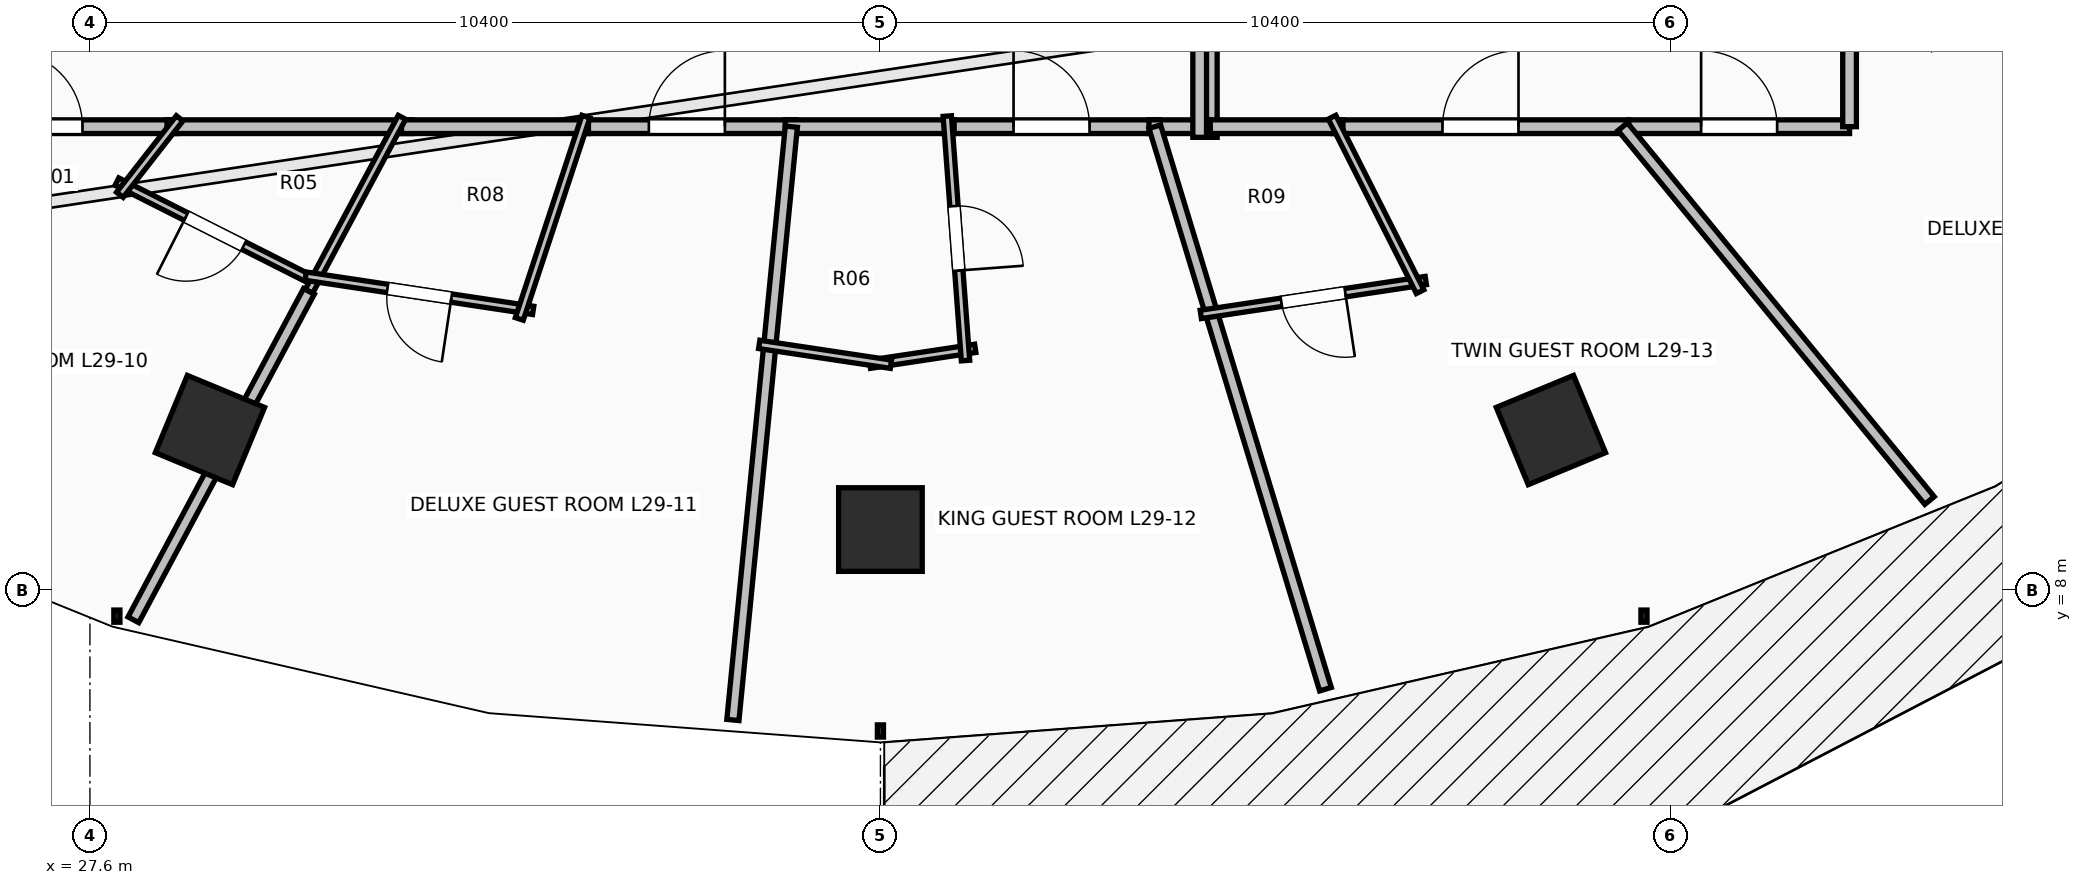
"""IFC4 building model, lengths in metres.
Left out: names, types, materials, properties, quantities, classifications, styles, units other than length and angle.
Written with IfcOpenShell. Run it as: python <this file> out.ifc"""

import sys

from ifc_helpers import new_model, si_unit, direction, frame, frame_2d, origin, origin_2d, place, context, subcontext, project, spatial, rectangle, extrude, element, fill, save


model = new_model("IFC4")
c1 = context("Model", 3, precision=1e-05, world=origin(), true_north=direction((0.0, 1.0)))
c2 = subcontext(c1, "Body", "Model", "MODEL_VIEW")
j1 = project(units=[si_unit("LENGTHUNIT", "METRE"), si_unit("PLANEANGLEUNIT", "RADIAN")], contexts=[c1])
p1 = place(None, origin())
s1 = spatial("IfcSite", under=j1, at=p1, CompositionType="ELEMENT")
p2 = place(p1, origin())
s2 = spatial("IfcBuilding", under=s1, at=p2, CompositionType="ELEMENT")
p3 = place(p2, frame((0.0, 0.0, 110.3)))
s3 = spatial("IfcBuildingStorey", under=s2, at=p3, CompositionType="ELEMENT", Elevation=110.3)
for number, where, z_axis, x_axis in (
    (1, (29.179, 10.109, 0.0), (0.0, 0.0, 1.0), (-0.383, -0.924, 0.0)),
    (2, (38.0, 8.8, 0.0), (0.0, 0.0, 1.0), (0.0, -1.0, 0.0)),
    (3, (46.821, 10.109, 0.0), (0.0, 0.0, 1.0), (0.383, -0.924, 0.0)),
):
    element("IfcColumn", number, at=place(p3, frame(where, z_axis=z_axis, x_axis=x_axis)), inside=s3, PredefinedType="COLUMN", context=c2, shape_type="SweptSolid", body=[
        extrude(rectangle(XDim=1.1, YDim=1.1, at=origin_2d()), origin(), (0.0, 0.0, 1.0), 3.5),
    ])
p4 = place(p3, frame((25.25, 14.1, 0.0), z_axis=(0.0, 0.0, 1.0), x_axis=(1.0, 0.0, 0.0)))
e4 = element("IfcWall", 4, at=p4, inside=s3, PredefinedType="PARTITIONING", context=c2, shape_type="SweptSolid", body=[
    extrude(rectangle(XDim=3.504, YDim=0.18, at=frame_2d((1.752, 0.0))), origin(), (0.0, 0.0, 1.0), 2.432),
])
p5 = place(p4, frame((1.252, 0.0, 0.0)))
e5 = element("IfcOpeningElement", 5, at=p5, cuts=e4, PredefinedType="OPENING", context=c2, shape_type="SweptSolid", body=[
    extrude(rectangle(XDim=1.0, YDim=2.15, at=frame_2d((0.5, 1.075))), frame((0.0, 0.105, 0.0), z_axis=(0.0, -1.0, 0.0), x_axis=(1.0, 0.0, 0.0)), (0.0, 0.0, 1.0), 0.21),
])
p6 = place(p3, frame((28.614, 14.1, 0.0), z_axis=(0.0, 0.0, 1.0), x_axis=(1.0, 0.0, 0.0)))
e6 = element("IfcWall", 6, at=p6, inside=s3, PredefinedType="PARTITIONING", context=c2, shape_type="SweptSolid", body=[
    extrude(rectangle(XDim=3.225, YDim=0.18, at=frame_2d((1.613, 0.0))), origin(), (0.0, 0.0, 1.0), 2.929),
])
p7 = place(p3, frame((34.019, 14.1, 0.0), z_axis=(0.0, 0.0, 1.0), x_axis=(1.0, 0.0, 0.0)))
e7 = element("IfcWall", 7, at=p7, inside=s3, PredefinedType="PARTITIONING", context=c2, shape_type="SweptSolid", body=[
    extrude(rectangle(XDim=2.869, YDim=0.18, at=frame_2d((1.435, 0.0))), origin(), (0.0, 0.0, 1.0), 2.929),
])
p8 = place(p7, frame((0.935, 0.0, 0.0)))
e8 = element("IfcOpeningElement", 8, at=p8, cuts=e7, PredefinedType="OPENING", context=c2, shape_type="SweptSolid", body=[
    extrude(rectangle(XDim=1.0, YDim=2.15, at=frame_2d((0.5, 1.075))), frame((0.0, 0.105, 0.0), z_axis=(0.0, -1.0, 0.0), x_axis=(1.0, 0.0, 0.0)), (0.0, 0.0, 1.0), 0.21),
])
p9 = place(p3, frame((31.699, 14.1, 0.0), z_axis=(0.0, 0.0, 1.0), x_axis=(1.0, 0.0, 0.0)))
e9 = element("IfcWall", 9, at=p9, inside=s3, PredefinedType="PARTITIONING", context=c2, shape_type="SweptSolid", body=[
    extrude(rectangle(XDim=2.46, YDim=0.18, at=frame_2d((1.23, 0.0))), origin(), (0.0, 0.0, 1.0), 2.929),
])
p10 = place(p3, frame((38.83, 14.1, 0.0), z_axis=(0.0, 0.0, 1.0), x_axis=(1.0, 0.0, 0.0)))
e10 = element("IfcWall", 10, at=p10, inside=s3, PredefinedType="PARTITIONING", context=c2, shape_type="SweptSolid", body=[
    extrude(rectangle(XDim=2.843, YDim=0.18, at=frame_2d((1.421, 0.0))), origin(), (0.0, 0.0, 1.0), 2.929),
])
p11 = place(p10, frame((0.921, 0.0, 0.0)))
e11 = element("IfcOpeningElement", 11, at=p11, cuts=e10, PredefinedType="OPENING", context=c2, shape_type="SweptSolid", body=[
    extrude(rectangle(XDim=1.0, YDim=2.15, at=frame_2d((0.5, 1.075))), frame((0.0, 0.105, 0.0), z_axis=(0.0, -1.0, 0.0), x_axis=(1.0, 0.0, 0.0)), (0.0, 0.0, 1.0), 0.21),
])
p12 = place(p3, frame((36.748, 14.1, 0.0), z_axis=(0.0, 0.0, 1.0), x_axis=(1.0, 0.0, 0.0)))
e12 = element("IfcWall", 12, at=p12, inside=s3, PredefinedType="PARTITIONING", context=c2, shape_type="SweptSolid", body=[
    extrude(rectangle(XDim=2.222, YDim=0.18, at=frame_2d((1.111, 0.0))), origin(), (0.0, 0.0, 1.0), 2.929),
])
p13 = place(p3, frame((43.945, 14.1, 0.0), z_axis=(0.0, 0.0, 1.0), x_axis=(1.0, 0.0, 0.0)))
e13 = element("IfcWall", 13, at=p13, inside=s3, PredefinedType="PARTITIONING", context=c2, shape_type="SweptSolid", body=[
    extrude(rectangle(XDim=3.899, YDim=0.18, at=frame_2d((1.949, 0.0))), origin(), (0.0, 0.0, 1.0), 2.432),
])
p14 = place(p13, frame((1.449, 0.0, 0.0)))
e14 = element("IfcOpeningElement", 14, at=p14, cuts=e13, PredefinedType="OPENING", context=c2, shape_type="SweptSolid", body=[
    extrude(rectangle(XDim=1.0, YDim=2.15, at=frame_2d((0.5, 1.075))), frame((0.0, 0.105, 0.0), z_axis=(0.0, -1.0, 0.0), x_axis=(1.0, 0.0, 0.0)), (0.0, 0.0, 1.0), 0.21),
])
p15 = place(p3, frame((42.34, 16.38, 0.0), z_axis=(0.0, 0.0, 1.0), x_axis=(0.0, -1.0, 0.0)))
e15 = element("IfcWall", 15, at=p15, inside=s3, PredefinedType="PARTITIONING", context=c2, shape_type="SweptSolid", body=[
    extrude(rectangle(XDim=2.42, YDim=0.18, at=frame_2d((1.21, 0.0))), origin(), (0.0, 0.0, 1.0), 2.929),
])
p16 = place(p3, frame((42.2, 14.1, 0.0), z_axis=(0.0, 0.0, 1.0), x_axis=(1.0, 0.0, 0.0)))
e16 = element("IfcWall", 16, at=p16, inside=s3, PredefinedType="PARTITIONING", context=c2, shape_type="SweptSolid", body=[
    extrude(rectangle(XDim=1.885, YDim=0.18, at=frame_2d((0.942, 0.0))), origin(), (0.0, 0.0, 1.0), 2.929),
])
p17 = place(p3, frame((41.533, 14.1, 0.0), z_axis=(0.0, 0.0, 1.0), x_axis=(1.0, 0.0, 0.0)))
e17 = element("IfcWall", 17, at=p17, inside=s3, PredefinedType="PARTITIONING", context=c2, shape_type="SweptSolid", body=[
    extrude(rectangle(XDim=0.807, YDim=0.18, at=frame_2d((0.404, 0.0))), origin(), (0.0, 0.0, 1.0), 2.929),
])
p18 = place(p3, frame((42.2, 13.96, 0.0), z_axis=(0.0, 0.0, 1.0), x_axis=(0.0, 1.0, 0.0)))
e18 = element("IfcWall", 18, at=p18, inside=s3, PredefinedType="PARTITIONING", context=c2, shape_type="SweptSolid", body=[
    extrude(rectangle(XDim=2.42, YDim=0.18, at=frame_2d((1.21, 0.0))), origin(), (0.0, 0.0, 1.0), 2.929),
])
p19 = place(p3, frame((47.844, 14.1, 0.0), z_axis=(0.0, 0.0, 1.0), x_axis=(1.0, 0.0, 0.0)))
e19 = element("IfcWall", 19, at=p19, inside=s3, PredefinedType="PARTITIONING", context=c2, shape_type="SweptSolid", body=[
    extrude(rectangle(XDim=2.906, YDim=0.18, at=frame_2d((1.453, 0.0))), origin(), (0.0, 0.0, 1.0), 2.432),
])
p20 = place(p19, frame((0.953, 0.0, 0.0)))
e20 = element("IfcOpeningElement", 20, at=p20, cuts=e19, PredefinedType="OPENING", context=c2, shape_type="SweptSolid", body=[
    extrude(rectangle(XDim=1.0, YDim=2.15, at=frame_2d((0.5, 1.075))), frame((0.0, 0.105, 0.0), z_axis=(0.0, -1.0, 0.0), x_axis=(1.0, 0.0, 0.0)), (0.0, 0.0, 1.0), 0.21),
])
p21 = place(p3, frame((50.75, 14.1, 0.0), z_axis=(0.0, 0.0, 1.0), x_axis=(0.0, 1.0, 0.0)))
e21 = element("IfcWall", 21, at=p21, inside=s3, PredefinedType="PARTITIONING", context=c2, shape_type="SweptSolid", body=[
    extrude(rectangle(XDim=1.99, YDim=0.18, at=frame_2d((0.995, 0.0))), origin(), (0.0, 0.0, 1.0), 2.432),
])
p22 = place(p3, frame((30.533, 12.075, 0.0), z_axis=(0.0, 0.0, 1.0), x_axis=(-0.89257679281, 0.450895407979, 0.0)))
e22 = element("IfcWall", 22, at=p22, inside=s3, PredefinedType="PARTITIONING", context=c2, shape_type="SweptSolid", body=[
    extrude(rectangle(XDim=2.888, YDim=0.11, at=frame_2d((1.444, 0.0))), origin(), (0.0, 0.0, 1.0), 2.432),
])
p23 = place(p22, frame((1.019, 0.0, 0.0)))
e23 = element("IfcOpeningElement", 23, at=p23, cuts=e22, PredefinedType="OPENING", context=c2, shape_type="SweptSolid", body=[
    extrude(rectangle(XDim=0.85, YDim=2.1, at=frame_2d((0.425, 1.05))), frame((0.0, 0.07, 0.0), z_axis=(0.0, -1.0, 0.0), x_axis=(1.0, 0.0, 0.0)), (0.0, 0.0, 1.0), 0.14),
])
p24 = place(p3, frame((27.994, 13.204, 0.0), z_axis=(0.0, 0.0, 1.0), x_axis=(0.615632914819, 0.788033066687, 0.0)))
e24 = element("IfcWall", 24, at=p24, inside=s3, PredefinedType="PARTITIONING", context=c2, shape_type="SweptSolid", body=[
    extrude(rectangle(XDim=1.277, YDim=0.11, at=frame_2d((0.639, 0.0))), origin(), (0.0, 0.0, 1.0), 2.432),
])
p25 = place(p3, frame((30.481, 11.934, 0.0), z_axis=(0.0, 0.0, 1.0), x_axis=(0.471456709401, 0.881889205718, 0.0)))
e25 = element("IfcWall", 25, at=p25, inside=s3, PredefinedType="PARTITIONING", context=c2, shape_type="SweptSolid", body=[
    extrude(rectangle(XDim=2.596, YDim=0.11, at=frame_2d((1.298, 0.0))), origin(), (0.0, 0.0, 1.0), 2.886),
])
p26 = place(p3, frame((28.172, 7.613, 0.0), z_axis=(0.0, 0.0, 1.0), x_axis=(0.47136925097, 0.881935955294, 0.0)))
e26 = element("IfcWall", 26, at=p26, inside=s3, PredefinedType="PARTITIONING", context=c2, shape_type="SweptSolid", body=[
    extrude(rectangle(XDim=4.899, YDim=0.16, at=frame_2d((2.449, 0.0))), origin(), (0.0, 0.0, 1.0), 2.677),
])
p27 = place(p3, frame((33.431, 11.683, 0.0), z_axis=(0.0, 0.0, 1.0), x_axis=(-0.988849795555, 0.148916358508, 0.0)))
e27 = element("IfcWall", 27, at=p27, inside=s3, PredefinedType="PARTITIONING", context=c2, shape_type="SweptSolid", body=[
    extrude(rectangle(XDim=3.026, YDim=0.11, at=frame_2d((1.513, 0.0))), origin(), (0.0, 0.0, 1.0), 2.886),
])
p28 = place(p27, frame((1.088, 0.0, 0.0)))
e28 = element("IfcOpeningElement", 28, at=p28, cuts=e27, PredefinedType="OPENING", context=c2, shape_type="SweptSolid", body=[
    extrude(rectangle(XDim=0.85, YDim=2.1, at=frame_2d((0.425, 1.05))), frame((0.0, 0.07, 0.0), z_axis=(0.0, -1.0, 0.0), x_axis=(1.0, 0.0, 0.0)), (0.0, 0.0, 1.0), 0.14),
])
p29 = place(p3, frame((34.126, 14.233, 0.0), z_axis=(0.0, 0.0, 1.0), x_axis=(-0.312749678962, -0.949835584882, 0.0)))
e29 = element("IfcWall", 29, at=p29, inside=s3, PredefinedType="PARTITIONING", context=c2, shape_type="SweptSolid", body=[
    extrude(rectangle(XDim=2.802, YDim=0.11, at=frame_2d((1.401, 0.0))), origin(), (0.0, 0.0, 1.0), 2.886),
])
p30 = place(p3, frame((36.059, 6.295, 0.0), z_axis=(0.0, 0.0, 1.0), x_axis=(0.098024226043, 0.995184028765, 0.0)))
e30 = element("IfcWall", 30, at=p30, inside=s3, PredefinedType="PARTITIONING", context=c2, shape_type="SweptSolid", body=[
    extrude(rectangle(XDim=7.843, YDim=0.16, at=frame_2d((3.921, 0.0))), origin(), (0.0, 0.0, 1.0), 2.677),
])
p31 = place(p3, frame((39.247, 11.184, 0.0), z_axis=(0.0, 0.0, 1.0), x_axis=(-0.988844156702, -0.148953797389, 0.0)))
e31 = element("IfcWall", 31, at=p31, inside=s3, PredefinedType="PARTITIONING", context=c2, shape_type="SweptSolid", body=[
    extrude(rectangle(XDim=1.401, YDim=0.11, at=frame_2d((0.701, 0.0))), origin(), (0.0, 0.0, 1.0), 3.24),
])
p32 = place(p3, frame((38.138, 10.975, 0.0), z_axis=(0.0, 0.0, 1.0), x_axis=(-0.988868806461, 0.148790065554, 0.0)))
e32 = element("IfcWall", 32, at=p32, inside=s3, PredefinedType="PARTITIONING", context=c2, shape_type="SweptSolid", body=[
    extrude(rectangle(XDim=1.752, YDim=0.11, at=frame_2d((0.876, 0.0))), origin(), (0.0, 0.0, 1.0), 3.24),
])
p33 = place(p3, frame((38.88, 14.24, 0.0), z_axis=(0.0, 0.0, 1.0), x_axis=(0.074340146514, -0.997232943006, 0.0)))
e33 = element("IfcWall", 33, at=p33, inside=s3, PredefinedType="PARTITIONING", context=c2, shape_type="SweptSolid", body=[
    extrude(rectangle(XDim=3.225, YDim=0.11, at=frame_2d((1.613, 0.0))), origin(), (0.0, 0.0, 1.0), 2.886),
])
p34 = place(p33, frame((1.188, 0.0, 0.0)))
e34 = element("IfcOpeningElement", 34, at=p34, cuts=e33, PredefinedType="OPENING", context=c2, shape_type="SweptSolid", body=[
    extrude(rectangle(XDim=0.85, YDim=2.1, at=frame_2d((0.425, 1.05))), frame((0.0, 0.07, 0.0), z_axis=(0.0, -1.0, 0.0), x_axis=(1.0, 0.0, 0.0)), (0.0, 0.0, 1.0), 0.14),
])
p35 = place(p3, frame((43.855, 6.7, 0.0), z_axis=(0.0, 0.0, 1.0), x_axis=(-0.290292155577, 0.956938067176, 0.0)))
e35 = element("IfcWall", 35, at=p35, inside=s3, PredefinedType="PARTITIONING", context=c2, shape_type="SweptSolid", body=[
    extrude(rectangle(XDim=7.733, YDim=0.16, at=frame_2d((3.867, 0.0))), origin(), (0.0, 0.0, 1.0), 2.432),
])
p36 = place(p3, frame((45.175, 12.076, 0.0), z_axis=(0.0, 0.0, 1.0), x_axis=(-0.988865063855, -0.148814937044, 0.0)))
e36 = element("IfcWall", 36, at=p36, inside=s3, PredefinedType="PARTITIONING", context=c2, shape_type="SweptSolid", body=[
    extrude(rectangle(XDim=2.994, YDim=0.11, at=frame_2d((1.497, 0.0))), origin(), (0.0, 0.0, 1.0), 2.432),
])
p37 = place(p36, frame((1.072, 0.0, 0.0)))
e37 = element("IfcOpeningElement", 37, at=p37, cuts=e36, PredefinedType="OPENING", context=c2, shape_type="SweptSolid", body=[
    extrude(rectangle(XDim=0.85, YDim=2.1, at=frame_2d((0.425, 1.05))), frame((0.0, 0.07, 0.0), z_axis=(0.0, -1.0, 0.0), x_axis=(1.0, 0.0, 0.0)), (0.0, 0.0, 1.0), 0.14),
])
p38 = place(p3, frame((43.942, 14.225, 0.0), z_axis=(0.0, 0.0, 1.0), x_axis=(0.450515334881, -0.892768689548, 0.0)))
e38 = element("IfcWall", 38, at=p38, inside=s3, PredefinedType="PARTITIONING", context=c2, shape_type="SweptSolid", body=[
    extrude(rectangle(XDim=2.571, YDim=0.11, at=frame_2d((1.285, 0.0))), origin(), (0.0, 0.0, 1.0), 2.432),
])
p39 = place(p3, frame((51.802, 9.182, 0.0), z_axis=(0.0, 0.0, 1.0), x_axis=(-0.634357186002, 0.773040076948, 0.0)))
e39 = element("IfcWall", 39, at=p39, inside=s3, PredefinedType="PARTITIONING", context=c2, shape_type="SweptSolid", body=[
    extrude(rectangle(XDim=6.362, YDim=0.16, at=frame_2d((3.181, 0.0))), origin(), (0.0, 0.0, 1.0), 2.432),
])
p40 = place(p5, origin())
e40 = element("IfcDoor", 40, at=p40, inside=s3, OperationType="SINGLE_SWING_LEFT", PredefinedType="DOOR", context=c2, shape_type="SweptSolid", body=[
    extrude(rectangle(XDim=1.0, YDim=2.15, at=frame_2d((0.5, 1.075))), frame((0.0, 0.025, 0.0), z_axis=(0.0, -1.0, 0.0), x_axis=(1.0, 0.0, 0.0)), (0.0, 0.0, 1.0), 0.05),
])
fill(e5, e40)
p41 = place(p8, origin())
e41 = element("IfcDoor", 41, at=p41, inside=s3, OperationType="SINGLE_SWING_RIGHT", PredefinedType="DOOR", context=c2, shape_type="SweptSolid", body=[
    extrude(rectangle(XDim=1.0, YDim=2.15, at=frame_2d((0.5, 1.075))), frame((0.0, 0.025, 0.0), z_axis=(0.0, -1.0, 0.0), x_axis=(1.0, 0.0, 0.0)), (0.0, 0.0, 1.0), 0.05),
])
fill(e8, e41)
p42 = place(p11, origin())
e42 = element("IfcDoor", 42, at=p42, inside=s3, OperationType="SINGLE_SWING_LEFT", PredefinedType="DOOR", context=c2, shape_type="SweptSolid", body=[
    extrude(rectangle(XDim=1.0, YDim=2.15, at=frame_2d((0.5, 1.075))), frame((0.0, 0.025, 0.0), z_axis=(0.0, -1.0, 0.0), x_axis=(1.0, 0.0, 0.0)), (0.0, 0.0, 1.0), 0.05),
])
fill(e11, e42)
p43 = place(p14, origin())
e43 = element("IfcDoor", 43, at=p43, inside=s3, OperationType="SINGLE_SWING_RIGHT", PredefinedType="DOOR", context=c2, shape_type="SweptSolid", body=[
    extrude(rectangle(XDim=1.0, YDim=2.15, at=frame_2d((0.5, 1.075))), frame((0.0, 0.025, 0.0), z_axis=(0.0, -1.0, 0.0), x_axis=(1.0, 0.0, 0.0)), (0.0, 0.0, 1.0), 0.05),
])
fill(e14, e43)
p44 = place(p20, origin())
e44 = element("IfcDoor", 44, at=p44, inside=s3, OperationType="SINGLE_SWING_LEFT", PredefinedType="DOOR", context=c2, shape_type="SweptSolid", body=[
    extrude(rectangle(XDim=1.0, YDim=2.15, at=frame_2d((0.5, 1.075))), frame((0.0, 0.025, 0.0), z_axis=(0.0, -1.0, 0.0), x_axis=(1.0, 0.0, 0.0)), (0.0, 0.0, 1.0), 0.05),
])
fill(e20, e44)
p45 = place(p23, origin())
e45 = element("IfcDoor", 45, at=p45, inside=s3, OperationType="SINGLE_SWING_RIGHT", PredefinedType="DOOR", context=c2, shape_type="SweptSolid", body=[
    extrude(rectangle(XDim=0.85, YDim=2.1, at=frame_2d((0.425, 1.05))), frame((0.0, 0.025, 0.0), z_axis=(0.0, -1.0, 0.0), x_axis=(1.0, 0.0, 0.0)), (0.0, 0.0, 1.0), 0.05),
])
fill(e23, e45)
p46 = place(p28, origin())
e46 = element("IfcDoor", 46, at=p46, inside=s3, OperationType="SINGLE_SWING_LEFT", PredefinedType="DOOR", context=c2, shape_type="SweptSolid", body=[
    extrude(rectangle(XDim=0.85, YDim=2.1, at=frame_2d((0.425, 1.05))), frame((0.0, 0.025, 0.0), z_axis=(0.0, -1.0, 0.0), x_axis=(1.0, 0.0, 0.0)), (0.0, 0.0, 1.0), 0.05),
])
fill(e28, e46)
p47 = place(p34, origin())
e47 = element("IfcDoor", 47, at=p47, inside=s3, OperationType="SINGLE_SWING_RIGHT", PredefinedType="DOOR", context=c2, shape_type="SweptSolid", body=[
    extrude(rectangle(XDim=0.85, YDim=2.1, at=frame_2d((0.425, 1.05))), frame((0.0, 0.025, 0.0), z_axis=(0.0, -1.0, 0.0), x_axis=(1.0, 0.0, 0.0)), (0.0, 0.0, 1.0), 0.05),
])
fill(e34, e47)
p48 = place(p37, origin())
e48 = element("IfcDoor", 48, at=p48, inside=s3, OperationType="SINGLE_SWING_LEFT", PredefinedType="DOOR", context=c2, shape_type="SweptSolid", body=[
    extrude(rectangle(XDim=0.85, YDim=2.1, at=frame_2d((0.425, 1.05))), frame((0.0, 0.025, 0.0), z_axis=(0.0, -1.0, 0.0), x_axis=(1.0, 0.0, 0.0)), (0.0, 0.0, 1.0), 0.05),
])
fill(e37, e48)
save(model, sys.argv[1])
